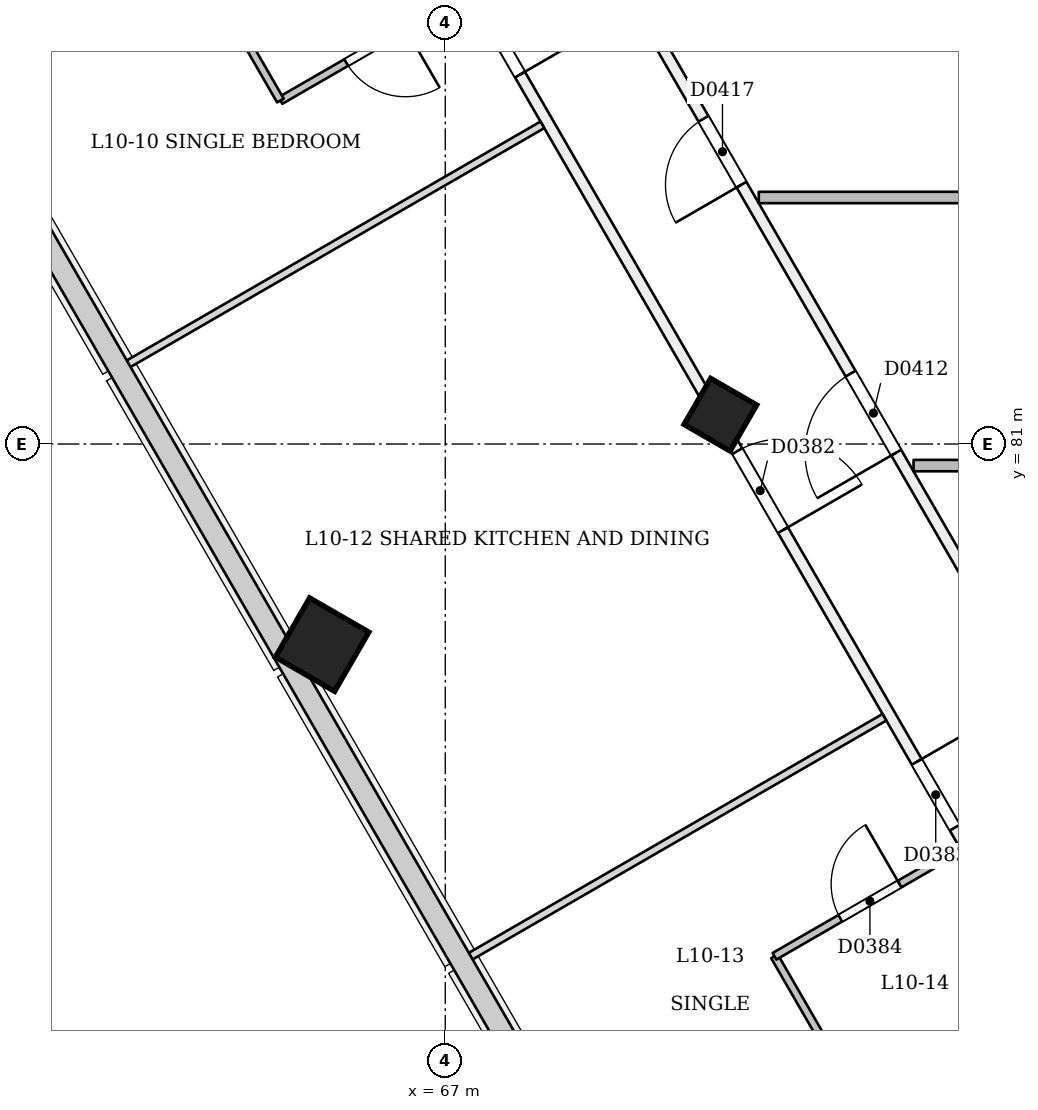
"""IFC4 building model, lengths in metres.
Left out: names, types, materials, properties, quantities, classifications, styles, units other than length and angle.
Written with IfcOpenShell. Run it as: python <this file> out.ifc"""

import sys

from ifc_helpers import new_model, si_unit, direction, frame, frame_2d, origin, origin_2d, place, context, subcontext, project, spatial, rectangle, extrude, element, fill, save


model = new_model("IFC4")
c1 = context("Model", 3, precision=1e-05, world=origin(), true_north=direction((0.0, 1.0)))
c2 = subcontext(c1, "Body", "Model", "MODEL_VIEW")
j1 = project(units=[si_unit("LENGTHUNIT", "METRE"), si_unit("PLANEANGLEUNIT", "RADIAN")], contexts=[c1])
p1 = place(None, origin())
s1 = spatial("IfcSite", under=j1, at=p1, CompositionType="ELEMENT")
p2 = place(p1, origin())
s2 = spatial("IfcBuilding", under=s1, at=p2, CompositionType="ELEMENT")
p3 = place(p2, frame((0.0, 0.0, 45.0)))
s3 = spatial("IfcBuildingStorey", under=s2, at=p3, CompositionType="ELEMENT", Elevation=45.0)
p4 = place(p3, frame((70.592, 81.339, -0.021), z_axis=(0.022221406801, 0.038413224561, 0.999014831351), x_axis=(-0.866018695017, -0.49853242796, 0.038432254077)))
e1 = element("IfcColumn", 1, at=p4, inside=s3, PredefinedType="COLUMN", context=c2, shape_type="SweptSolid", body=[
    extrude(rectangle(XDim=0.7, YDim=0.7, at=origin_2d()), origin(), (0.0, 0.0, 1.0), 3.604),
])
p5 = place(p3, frame((65.353, 78.314, -0.027), z_axis=(0.02222134892, 0.038480872521, 0.999012229206), x_axis=(-0.865636730018, -0.499191460381, 0.038482951101)))
e2 = element("IfcColumn", 2, at=p5, inside=s3, PredefinedType="COLUMN", context=c2, shape_type="SweptSolid", body=[
    extrude(rectangle(XDim=0.9, YDim=0.9, at=origin_2d()), origin(), (0.0, 0.0, 1.0), 3.604),
])
p6 = place(p3, frame((61.853, 96.477, 0.0), z_axis=(0.0, 0.0, 1.0), x_axis=(0.500000327816, -0.86602521452, 0.0)))
e3 = element("IfcWall", 3, at=p6, inside=s3, PredefinedType="PARTITIONING", context=c2, shape_type="SweptSolid", body=[
    extrude(rectangle(XDim=39.979, YDim=0.15, at=frame_2d((19.99, 0.0))), origin(), (0.0, 0.0, 1.0), 2.7),
])
p7 = place(p6, frame((1.49, 0.0, 0.0)))
e4 = element("IfcOpeningElement", 4, at=p7, cuts=e3, PredefinedType="OPENING", context=c2, shape_type="SweptSolid", body=[
    extrude(rectangle(XDim=1.0, YDim=2.1, at=frame_2d((0.5, 1.05))), frame((0.0, 0.085, 0.0), z_axis=(0.0, -1.0, 0.0), x_axis=(1.0, 0.0, 0.0)), (0.0, 0.0, 1.0), 0.171),
])
p8 = place(p6, frame((4.55, 0.0, 0.0)))
e5 = element("IfcOpeningElement", 5, at=p8, cuts=e3, PredefinedType="OPENING", context=c2, shape_type="SweptSolid", body=[
    extrude(rectangle(XDim=1.1, YDim=2.1, at=frame_2d((0.55, 1.05))), frame((0.0, 0.085, 0.0), z_axis=(0.0, -1.0, 0.0), x_axis=(1.0, 0.0, 0.0)), (0.0, 0.0, 1.0), 0.171),
])
p9 = place(p6, frame((11.259, 0.0, 0.0)))
e6 = element("IfcOpeningElement", 6, at=p9, cuts=e3, PredefinedType="OPENING", context=c2, shape_type="SweptSolid", body=[
    extrude(rectangle(XDim=1.0, YDim=2.1, at=frame_2d((0.5, 1.05))), frame((0.0, 0.085, 0.0), z_axis=(0.0, -1.0, 0.0), x_axis=(1.0, 0.0, 0.0)), (0.0, 0.0, 1.0), 0.171),
])
p10 = place(p6, frame((17.979, 0.0, 0.0)))
e7 = element("IfcOpeningElement", 7, at=p10, cuts=e3, PredefinedType="OPENING", context=c2, shape_type="SweptSolid", body=[
    extrude(rectangle(XDim=1.2, YDim=2.1, at=frame_2d((0.6, 1.05))), frame((0.0, 0.085, 0.0), z_axis=(0.0, -1.0, 0.0), x_axis=(1.0, 0.0, 0.0)), (0.0, 0.0, 1.0), 0.171),
])
p11 = place(p6, frame((22.699, 0.0, 0.0)))
e8 = element("IfcOpeningElement", 8, at=p11, cuts=e3, PredefinedType="OPENING", context=c2, shape_type="SweptSolid", body=[
    extrude(rectangle(XDim=1.0, YDim=2.1, at=frame_2d((0.5, 1.05))), frame((0.0, 0.085, 0.0), z_axis=(0.0, -1.0, 0.0), x_axis=(1.0, 0.0, 0.0)), (0.0, 0.0, 1.0), 0.171),
])
p12 = place(p6, frame((29.374, 0.0, 0.0)))
e9 = element("IfcOpeningElement", 9, at=p12, cuts=e3, PredefinedType="OPENING", context=c2, shape_type="SweptSolid", body=[
    extrude(rectangle(XDim=1.0, YDim=2.1, at=frame_2d((0.5, 1.05))), frame((0.0, 0.085, 0.0), z_axis=(0.0, -1.0, 0.0), x_axis=(1.0, 0.0, 0.0)), (0.0, 0.0, 1.0), 0.171),
])
p13 = place(p6, frame((31.584, 0.0, 0.0)))
e10 = element("IfcOpeningElement", 10, at=p13, cuts=e3, PredefinedType="OPENING", context=c2, shape_type="SweptSolid", body=[
    extrude(rectangle(XDim=1.0, YDim=2.1, at=frame_2d((0.5, 1.05))), frame((0.0, 0.085, 0.0), z_axis=(0.0, -1.0, 0.0), x_axis=(1.0, 0.0, 0.0)), (0.0, 0.0, 1.0), 0.171),
])
p14 = place(p6, frame((38.374, 0.0, 0.0)))
e11 = element("IfcOpeningElement", 11, at=p14, cuts=e3, PredefinedType="OPENING", context=c2, shape_type="SweptSolid", body=[
    extrude(rectangle(XDim=1.0, YDim=2.1, at=frame_2d((0.5, 1.05))), frame((0.0, 0.085, 0.0), z_axis=(0.0, -1.0, 0.0), x_axis=(1.0, 0.0, 0.0)), (0.0, 0.0, 1.0), 0.171),
])
p15 = place(p3, frame((85.0, 59.985, 0.0), z_axis=(0.0, 0.0, 1.0), x_axis=(-0.499997052475, 0.866027105532, 0.0)))
e12 = element("IfcWall", 12, at=p15, inside=s3, PredefinedType="PARTITIONING", context=c2, shape_type="SweptSolid", body=[
    extrude(rectangle(XDim=35.351, YDim=0.15, at=frame_2d((17.675, 0.0))), origin(), (0.0, 0.0, 1.0), 3.1),
])
p16 = place(p15, frame((18.895, 0.0, 0.0)))
e13 = element("IfcOpeningElement", 13, at=p16, cuts=e12, PredefinedType="OPENING", context=c2, shape_type="SweptSolid", body=[
    extrude(rectangle(XDim=1.2, YDim=2.1, at=frame_2d((0.6, 1.05))), frame((0.0, 0.085, 0.0), z_axis=(0.0, -1.0, 0.0), x_axis=(1.0, 0.0, 0.0)), (0.0, 0.0, 1.0), 0.171),
])
p17 = place(p15, frame((24.135, 0.0, 0.0)))
e14 = element("IfcOpeningElement", 14, at=p17, cuts=e12, PredefinedType="OPENING", context=c2, shape_type="SweptSolid", body=[
    extrude(rectangle(XDim=1.2, YDim=2.1, at=frame_2d((0.6, 1.05))), frame((0.0, 0.085, 0.0), z_axis=(0.0, -1.0, 0.0), x_axis=(1.0, 0.0, 0.0)), (0.0, 0.0, 1.0), 0.171),
])
p18 = place(p15, frame((14.175, 0.0, 0.0)))
e15 = element("IfcOpeningElement", 15, at=p18, cuts=e12, PredefinedType="OPENING", context=c2, shape_type="SweptSolid", body=[
    extrude(rectangle(XDim=1.2, YDim=2.1, at=frame_2d((0.6, 1.05))), frame((0.0, 0.085, 0.0), z_axis=(0.0, -1.0, 0.0), x_axis=(1.0, 0.0, 0.0)), (0.0, 0.0, 1.0), 0.171),
])
p19 = place(p15, frame((31.812, 0.0, 0.0)))
e16 = element("IfcOpeningElement", 16, at=p19, cuts=e12, PredefinedType="OPENING", context=c2, shape_type="SweptSolid", body=[
    extrude(rectangle(XDim=1.2, YDim=2.1, at=frame_2d((0.6, 1.05))), frame((0.0, 0.085, 0.0), z_axis=(0.0, -1.0, 0.0), x_axis=(1.0, 0.0, 0.0)), (0.0, 0.0, 1.0), 0.171),
])
p20 = place(p15, frame((8.541, 0.0, 0.0)))
e17 = element("IfcOpeningElement", 17, at=p20, cuts=e12, PredefinedType="OPENING", context=c2, shape_type="SweptSolid", body=[
    extrude(rectangle(XDim=1.2, YDim=2.1, at=frame_2d((0.6, 1.05))), frame((0.0, 0.085, 0.0), z_axis=(0.0, -1.0, 0.0), x_axis=(1.0, 0.0, 0.0)), (0.0, 0.0, 1.0), 0.171),
])
p21 = place(p15, frame((28.206, 0.0, 0.0)))
e18 = element("IfcOpeningElement", 18, at=p21, cuts=e12, PredefinedType="OPENING", context=c2, shape_type="SweptSolid", body=[
    extrude(rectangle(XDim=1.0, YDim=2.1, at=frame_2d((0.5, 1.05))), frame((0.0, 0.085, 0.0), z_axis=(0.0, -1.0, 0.0), x_axis=(1.0, 0.0, 0.0)), (0.0, 0.0, 1.0), 0.171),
])
p22 = place(p15, frame((3.634, 0.0, 0.0)))
e19 = element("IfcOpeningElement", 19, at=p22, cuts=e12, PredefinedType="OPENING", context=c2, shape_type="SweptSolid", body=[
    extrude(rectangle(XDim=1.0, YDim=2.1, at=frame_2d((0.5, 1.05))), frame((0.0, 0.085, 0.0), z_axis=(0.0, -1.0, 0.0), x_axis=(1.0, 0.0, 0.0)), (0.0, 0.0, 1.0), 0.171),
])
p23 = place(p3, frame((60.55, 85.934, 0.0), z_axis=(0.0, 0.0, 1.0), x_axis=(0.866032430508, 0.49998782916, 0.0)))
e20 = element("IfcWall", 20, at=p23, inside=s3, PredefinedType="PARTITIONING", context=c2, shape_type="SweptSolid", body=[
    extrude(rectangle(XDim=2.92, YDim=0.15, at=frame_2d((1.46, 0.0))), origin(), (0.0, 0.0, 1.0), 2.6),
])
p24 = place(p3, frame((67.278, 86.931, 0.0), z_axis=(0.0, 0.0, 1.0), x_axis=(-0.866048868473, -0.499959355765, 0.0)))
e21 = element("IfcWall", 21, at=p24, inside=s3, PredefinedType="PARTITIONING", context=c2, shape_type="SweptSolid", body=[
    extrude(rectangle(XDim=2.825, YDim=0.1, at=frame_2d((1.413, 0.0))), origin(), (0.0, 0.0, 1.0), 3.1),
])
p25 = place(p24, frame((0.925, 0.0, 0.0)))
e22 = element("IfcOpeningElement", 22, at=p25, cuts=e21, PredefinedType="OPENING", context=c2, shape_type="SweptSolid", body=[
    extrude(rectangle(XDim=0.9, YDim=2.1, at=frame_2d((0.45, 1.05))), frame((0.0, 0.061, 0.0), z_axis=(0.0, -1.0, 0.0), x_axis=(1.0, 0.0, 0.0)), (0.0, 0.0, 1.0), 0.121),
])
p26 = place(p3, frame((64.831, 85.519, 0.0), z_axis=(0.0, 0.0, 1.0), x_axis=(-0.499943856944, 0.866057815567, 0.0)))
e23 = element("IfcWall", 23, at=p26, inside=s3, PredefinedType="PARTITIONING", context=c2, shape_type="SweptSolid", body=[
    extrude(rectangle(XDim=2.45, YDim=0.1, at=frame_2d((1.225, 0.0))), origin(), (0.0, 0.0, 1.0), 2.7),
])
for number, where, z_axis, x_axis in (
    (24, (62.782, 82.027, 0.0), (0.0, 0.0, 1.0), (0.866, 0.5, 0.0)),
    (25, (67.282, 74.233, 0.0), (0.0, 0.0, 1.0), (0.866, 0.5, 0.0)),
):
    element("IfcWall", number, at=place(p3, frame(where, z_axis=z_axis, x_axis=x_axis)), inside=s3, PredefinedType="PARTITIONING", context=c2, shape_type="SweptSolid", body=[
        extrude(rectangle(XDim=6.345, YDim=0.1, at=frame_2d((3.173, 0.0))), origin(), (0.0, 0.0, 1.0), 2.6),
    ])
p27 = place(p3, frame((72.431, 72.355, 0.0), z_axis=(0.0, 0.0, 1.0), x_axis=(-0.50002983664, 0.866008176907, 0.0)))
e26 = element("IfcWall", 26, at=p27, inside=s3, PredefinedType="PARTITIONING", context=c2, shape_type="SweptSolid", body=[
    extrude(rectangle(XDim=2.2, YDim=0.1, at=frame_2d((1.1, 0.0))), origin(), (0.0, 0.0, 1.0), 3.1),
])
p28 = place(p3, frame((71.331, 74.261, 0.0), z_axis=(0.0, 0.0, 1.0), x_axis=(0.866048868473, 0.499959355765, 0.0)))
e27 = element("IfcWall", 27, at=p28, inside=s3, PredefinedType="PARTITIONING", context=c2, shape_type="SweptSolid", body=[
    extrude(rectangle(XDim=2.825, YDim=0.1, at=frame_2d((1.413, 0.0))), origin(), (0.0, 0.0, 1.0), 3.1),
])
p29 = place(p28, frame((1.0, 0.0, 0.0)))
e28 = element("IfcOpeningElement", 28, at=p29, cuts=e27, PredefinedType="OPENING", context=c2, shape_type="SweptSolid", body=[
    extrude(rectangle(XDim=0.9, YDim=2.1, at=frame_2d((0.45, 1.05))), frame((0.0, 0.061, 0.0), z_axis=(0.0, -1.0, 0.0), x_axis=(1.0, 0.0, 0.0)), (0.0, 0.0, 1.0), 0.121),
])
p30 = place(p3, frame((72.564, 72.086, 0.0), z_axis=(0.0, 0.0, 1.0), x_axis=(0.866048401274, 0.499960165064, 0.0)))
e29 = element("IfcWall", 29, at=p30, inside=s3, PredefinedType="PARTITIONING", context=c2, shape_type="SweptSolid", body=[
    extrude(rectangle(XDim=2.845, YDim=0.1, at=frame_2d((1.422, 0.0))), origin(), (0.0, 0.0, 1.0), 2.7),
])
p31 = place(p3, frame((87.959, 80.717, 0.0), z_axis=(0.0, 0.0, 1.0), x_axis=(-1.0, 0.0, 0.0)))
e30 = element("IfcWall", 30, at=p31, inside=s3, PredefinedType="PARTITIONING", context=c2, shape_type="SweptSolid", body=[
    extrude(rectangle(XDim=14.798, YDim=0.15, at=frame_2d((7.399, 0.0))), origin(), (0.0, 0.0, 1.0), 3.1),
])
p32 = place(p3, frame((82.0, 84.244, 0.0), z_axis=(0.0, 0.0, 1.0), x_axis=(-1.0, 0.0, 0.0)))
e31 = element("IfcWall", 31, at=p32, inside=s3, PredefinedType="PARTITIONING", context=c2, shape_type="SweptSolid", body=[
    extrude(rectangle(XDim=10.875, YDim=0.15, at=frame_2d((5.438, 0.0))), origin(), (0.0, 0.0, 1.0), 3.1),
])
p33 = place(p9, origin())
e32 = element("IfcDoor", 32, at=p33, inside=s3, OperationType="SINGLE_SWING_RIGHT", PredefinedType="NOTDEFINED", context=c2, shape_type="SweptSolid", body=[
    extrude(rectangle(XDim=1.0, YDim=2.1, at=frame_2d((0.5, 1.05))), frame((0.0, 0.025, 0.0), z_axis=(0.0, -1.0, 0.0), x_axis=(1.0, 0.0, 0.0)), (0.0, 0.0, 1.0), 0.05),
])
fill(e6, e32)
p34 = place(p25, origin())
e33 = element("IfcDoor", 33, at=p34, inside=s3, OperationType="SINGLE_SWING_LEFT", PredefinedType="NOTDEFINED", context=c2, shape_type="SweptSolid", body=[
    extrude(rectangle(XDim=0.9, YDim=2.1, at=frame_2d((0.45, 1.05))), frame((0.0, 0.025, 0.0), z_axis=(0.0, -1.0, 0.0), x_axis=(1.0, 0.0, 0.0)), (0.0, 0.0, 1.0), 0.05),
])
fill(e22, e33)
p35 = place(p10, origin())
e34 = element("IfcDoor", 34, at=p35, inside=s3, OperationType="SINGLE_SWING_RIGHT", PredefinedType="NOTDEFINED", context=c2, shape_type="SweptSolid", body=[
    extrude(rectangle(XDim=1.2, YDim=2.1, at=frame_2d((0.6, 1.05))), frame((0.0, 0.025, 0.0), z_axis=(0.0, -1.0, 0.0), x_axis=(1.0, 0.0, 0.0)), (0.0, 0.0, 1.0), 0.05),
])
fill(e7, e34)
p36 = place(p11, origin())
e35 = element("IfcDoor", 35, at=p36, inside=s3, OperationType="SINGLE_SWING_LEFT", PredefinedType="NOTDEFINED", context=c2, shape_type="SweptSolid", body=[
    extrude(rectangle(XDim=1.0, YDim=2.1, at=frame_2d((0.5, 1.05))), frame((0.0, 0.025, 0.0), z_axis=(0.0, -1.0, 0.0), x_axis=(1.0, 0.0, 0.0)), (0.0, 0.0, 1.0), 0.05),
])
fill(e8, e35)
p37 = place(p29, origin())
e36 = element("IfcDoor", 36, at=p37, inside=s3, OperationType="SINGLE_SWING_RIGHT", PredefinedType="NOTDEFINED", context=c2, shape_type="SweptSolid", body=[
    extrude(rectangle(XDim=0.9, YDim=2.1, at=frame_2d((0.45, 1.05))), frame((0.0, 0.025, 0.0), z_axis=(0.0, -1.0, 0.0), x_axis=(1.0, 0.0, 0.0)), (0.0, 0.0, 1.0), 0.05),
])
fill(e28, e36)
p38 = place(p17, origin())
e37 = element("IfcDoor", 37, at=p38, inside=s3, OperationType="SINGLE_SWING_LEFT", PredefinedType="NOTDEFINED", context=c2, shape_type="SweptSolid", body=[
    extrude(rectangle(XDim=1.2, YDim=2.1, at=frame_2d((0.6, 1.05))), frame((0.0, 0.025, 0.0), z_axis=(0.0, -1.0, 0.0), x_axis=(1.0, 0.0, 0.0)), (0.0, 0.0, 1.0), 0.05),
])
fill(e14, e37)
p39 = place(p21, origin())
e38 = element("IfcDoor", 38, at=p39, inside=s3, OperationType="SINGLE_SWING_LEFT", PredefinedType="NOTDEFINED", context=c2, shape_type="SweptSolid", body=[
    extrude(rectangle(XDim=1.0, YDim=2.1, at=frame_2d((0.5, 1.05))), frame((0.0, 0.025, 0.0), z_axis=(0.0, -1.0, 0.0), x_axis=(1.0, 0.0, 0.0)), (0.0, 0.0, 1.0), 0.05),
])
fill(e18, e38)
save(model, sys.argv[1])
